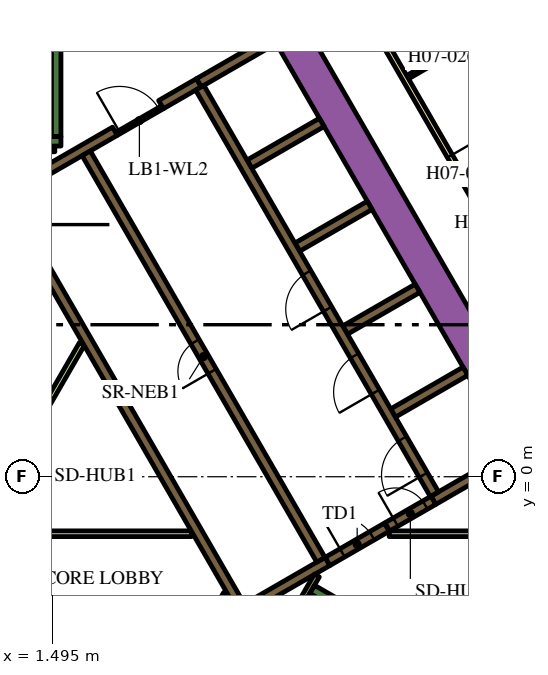
"""IFC4 building model, lengths in metres.
Left out: names, types, materials, properties, quantities, classifications, styles, units other than length and angle.
Written with IfcOpenShell. Run it as: python <this file> out.ifc"""

import sys

from ifc_helpers import new_model, si_unit, direction, frame, frame_2d, origin, place, context, subcontext, project, spatial, polyline, rectangle, outline, extrude, element, fill, save


model = new_model("IFC4")
c1 = context("Model", 3, precision=1e-05, world=origin(), true_north=direction((0.0, 1.0)))
c2 = subcontext(c1, "Body", "Model", "MODEL_VIEW")
j1 = project(units=[si_unit("LENGTHUNIT", "METRE"), si_unit("PLANEANGLEUNIT", "RADIAN")], contexts=[c1])
p1 = place(None, origin())
s1 = spatial("IfcSite", under=j1, at=p1, CompositionType="ELEMENT")
p2 = place(p1, origin())
s2 = spatial("IfcBuilding", under=s1, at=p2, CompositionType="ELEMENT")
p3 = place(p2, frame((0.0, 0.0, 99.3)))
s3 = spatial("IfcBuildingStorey", under=s2, at=p3, CompositionType="ELEMENT", Elevation=99.3)
p4 = place(p3, frame((6.776, 13.364, 0.0), z_axis=(0.0, 0.0, 1.0), x_axis=(0.500004177138, -0.8660229921, 0.0)))
e1 = element("IfcWall", 1, at=p4, inside=s3, PredefinedType="SOLIDWALL", context=c2, shape_type="SweptSolid", body=[
    extrude(rectangle(XDim=20.204, YDim=0.9, at=frame_2d((10.102, 0.0))), origin(), (0.0, 0.0, 1.0), 3.9),
])
p5 = place(p3, frame((8.334, -2.964, 0.0), z_axis=(0.0, 0.0, 1.0), x_axis=(0.866016039709, -0.500016218704, 0.0)))
e2 = element("IfcWall", 2, at=p5, inside=s3, PredefinedType="SOLIDWALL", context=c2, shape_type="SweptSolid", body=[
    extrude(rectangle(XDim=7.05, YDim=0.25, at=frame_2d((3.525, 0.0))), origin(), (0.0, 0.0, 1.0), 3.9),
])
p6 = place(p3, frame((8.168, -3.503, 0.0), z_axis=(0.0, 0.0, 1.0), x_axis=(0.49972245349, 0.866185586049, 0.0)))
e3 = element("IfcWall", 3, at=p6, inside=s3, PredefinedType="SOLIDWALL", context=c2, shape_type="SweptSolid", body=[
    extrude(rectangle(XDim=0.425, YDim=0.25, at=frame_2d((0.212, 0.0))), origin(), (0.0, 0.0, 1.0), 3.9),
])
p7 = place(p3, frame((1.6, 8.95, 0.0), z_axis=(0.0, 0.0, 1.0), x_axis=(0.0, 1.0, 0.0)))
e4 = element("IfcWall", 4, at=p7, inside=s3, PredefinedType="SOLIDWALL", context=c2, shape_type="SweptSolid", body=[
    extrude(rectangle(XDim=6.8, YDim=0.25, at=frame_2d((3.4, 0.0))), origin(), (0.0, 0.0, 1.0), 3.9),
])
p8 = place(p3, frame((1.05, 8.825, 0.0), z_axis=(0.0, 0.0, 1.0), x_axis=(1.0, 0.0, 0.0)))
e5 = element("IfcWall", 5, at=p8, inside=s3, PredefinedType="SOLIDWALL", context=c2, shape_type="SweptSolid", body=[
    extrude(rectangle(XDim=0.675, YDim=0.25, at=frame_2d((0.337, 0.0))), origin(), (0.0, 0.0, 1.0), 3.9),
])
p9 = place(p3, frame((10.464, 1.677, 0.0), z_axis=(0.0, 0.0, 1.0), x_axis=(0.86605622881, 0.499946605688, 0.0)))
e6 = element("IfcWall", 6, at=p9, inside=s3, PredefinedType="SOLIDWALL", context=c2, shape_type="SweptSolid", body=[
    extrude(rectangle(XDim=2.2, YDim=0.25, at=frame_2d((1.1, 0.0))), origin(), (0.0, 0.0, 1.0), 3.9),
])
p10 = place(p3, frame((13.629, 0.594, 0.0), z_axis=(0.0, 0.0, 1.0), x_axis=(-0.866063384774, -0.499934209226, 0.0)))
e7 = element("IfcWall", 7, at=p10, inside=s3, PredefinedType="SOLIDWALL", context=c2, shape_type="SweptSolid", body=[
    extrude(rectangle(XDim=2.428, YDim=0.25, at=frame_2d((1.214, 0.0))), origin(), (0.0, 0.0, 1.0), 3.9),
])
p11 = place(p3, origin())
e8 = element("IfcWall", 8, at=p11, inside=s3, PredefinedType="SOLIDWALL", context=c2, shape_type="SweptSolid", body=[
    extrude(outline(polyline([(0.566, 6.725), (0.566, 6.875), (0.566, 6.875), (0.565, 6.875), (0.361, 6.875), (0.035, 7.439), (0.252, 7.564), (0.377, 7.348), (6.552, -3.348), (6.677, -3.564), (6.46, -3.689), (0.448, 6.725), (0.565, 6.725), (0.566, 6.725), (0.566, 6.725)])), origin(), (0.0, 0.0, 1.0), 3.9),
])
p12 = place(p3, frame((4.358, 9.791, 0.0), z_axis=(0.0, 0.0, 1.0), x_axis=(0.866079547155, 0.499906209203, 0.0)))
e9 = element("IfcWall", 9, at=p12, inside=s3, PredefinedType="SOLIDWALL", context=c2, shape_type="SweptSolid", body=[
    extrude(rectangle(XDim=1.15, YDim=0.25, at=frame_2d((0.575, 0.0))), origin(), (0.0, 0.0, 1.0), 3.9),
])
p13 = place(p3, frame((5.356, 10.367, 0.0), z_axis=(0.0, 0.0, 1.0), x_axis=(0.865978535641, 0.50008116922, 0.0)))
e10 = element("IfcWall", 10, at=p13, inside=s3, PredefinedType="SOLIDWALL", context=c2, shape_type="SweptSolid", body=[
    extrude(rectangle(XDim=2.278, YDim=0.25, at=frame_2d((1.139, 0.0))), origin(), (0.0, 0.0, 1.0), 3.9),
])
p14 = place(p3, frame((0.314, 7.456, 0.0), z_axis=(0.0, 0.0, 1.0), x_axis=(0.866013897511, 0.50001992892, 0.0)))
e11 = element("IfcWall", 11, at=p14, inside=s3, PredefinedType="SOLIDWALL", context=c2, shape_type="SweptSolid", body=[
    extrude(rectangle(XDim=3.268, YDim=0.25, at=frame_2d((1.634, 0.0))), origin(), (0.0, 0.0, 1.0), 3.9),
])
p15 = place(p3, frame((6.614, -3.456, 0.0), z_axis=(0.0, 0.0, 1.0), x_axis=(0.866031582473, 0.499989298045, 0.0)))
e12 = element("IfcWall", 12, at=p15, inside=s3, PredefinedType="SOLIDWALL", context=c2, shape_type="SweptSolid", body=[
    extrude(rectangle(XDim=2.455, YDim=0.25, at=frame_2d((1.228, 0.0))), origin(), (0.0, 0.0, 1.0), 3.9),
])
for number, where, z_axis, x_axis in (
    (13, (6.684, 8.224, 0.0), (0.0, 0.0, 1.0), (0.866, 0.5, 0.0)),
    (14, (7.944, 6.041, 0.0), (0.0, 0.0, 1.0), (0.866, 0.5, 0.0)),
    (15, (9.204, 3.859, 0.0), (0.0, 0.0, 1.0), (0.866, 0.5, 0.0)),
):
    element("IfcWall", number, at=place(p3, frame(where, z_axis=z_axis, x_axis=x_axis)), inside=s3, PredefinedType="SOLIDWALL", context=c2, shape_type="SweptSolid", body=[
        extrude(rectangle(XDim=2.2, YDim=0.25, at=frame_2d((1.1, 0.0))), origin(), (0.0, 0.0, 1.0), 3.9),
    ])
p16 = place(p3, frame((5.705, -3.718, 0.0), z_axis=(0.0, 0.0, 1.0), x_axis=(0.499962090823, 0.866047289552, 0.0)))
e16 = element("IfcWall", 16, at=p16, inside=s3, PredefinedType="PARTITIONING", context=c2, shape_type="SweptSolid", body=[
    extrude(rectangle(XDim=0.735, YDim=0.15, at=frame_2d((0.367, 0.0))), origin(), (0.0, 0.0, 1.0), 2.75),
])
p17 = place(p3, frame((8.459, -2.599, 0.0), z_axis=(0.0, 0.0, 1.0), x_axis=(-0.500041054325, -0.866001699761, 0.0)))
e17 = element("IfcWall", 17, at=p17, inside=s3, PredefinedType="PARTITIONING", context=c2, shape_type="SweptSolid", body=[
    extrude(rectangle(XDim=0.929, YDim=0.15, at=frame_2d((0.464, 0.0))), origin(), (0.0, 0.0, 1.0), 3.9),
])
p18 = place(p3, frame((10.362, -1.5, 0.0), z_axis=(0.0, 0.0, 1.0), x_axis=(1.0, 0.0, 0.0)))
e18 = element("IfcWall", 18, at=p18, inside=s3, PredefinedType="PARTITIONING", context=c2, shape_type="SweptSolid", body=[
    extrude(rectangle(XDim=4.439, YDim=0.15, at=frame_2d((2.22, 0.0))), origin(), (0.0, 0.0, 1.0), 2.75),
])
p19 = place(p3, frame((-4.2, -1.5, 0.0), z_axis=(0.0, 0.0, 1.0), x_axis=(1.0, 0.0, 0.0)))
e19 = element("IfcWall", 19, at=p19, inside=s3, PredefinedType="PARTITIONING", context=c2, shape_type="SweptSolid", body=[
    extrude(rectangle(XDim=9.359, YDim=0.15, at=frame_2d((4.68, 0.0))), origin(), (0.0, 0.0, 1.0), 2.75),
])
p20 = place(p3, frame((1.312, 1.822, 0.0), z_axis=(0.0, 0.0, 1.0), x_axis=(0.500003549559, 0.866023354436, 0.0)))
e20 = element("IfcWall", 20, at=p20, inside=s3, PredefinedType="PARTITIONING", context=c2, shape_type="SweptSolid", body=[
    extrude(rectangle(XDim=1.93, YDim=0.15, at=frame_2d((0.965, 0.0))), origin(), (0.0, 0.0, 1.0), 2.75),
])
p21 = place(p3, frame((1.05, 8.625, 0.0), z_axis=(0.0, 0.0, 1.0), x_axis=(1.0, 0.0, 0.0)))
e21 = element("IfcWall", 21, at=p21, inside=s3, PredefinedType="PARTITIONING", context=c2, shape_type="SweptSolid", body=[
    extrude(rectangle(XDim=0.514, YDim=0.15, at=frame_2d((0.257, 0.0))), origin(), (0.0, 0.0, 1.0), 2.75),
])
p22 = place(p3, frame((11.553, -0.46, 0.0), z_axis=(0.0, 0.0, 1.0), x_axis=(-0.500006514828, 0.866021642414, 0.0)))
e22 = element("IfcWall", 22, at=p22, inside=s3, PredefinedType="SOLIDWALL", context=c2, shape_type="SweptSolid", body=[
    extrude(rectangle(XDim=12.35, YDim=0.25, at=frame_2d((6.175, 0.0))), origin(), (0.0, 0.0, 1.0), 3.9),
])
p23 = place(p22, frame((0.585, 0.0, 0.0)))
e23 = element("IfcOpeningElement", 23, at=p23, cuts=e22, PredefinedType="OPENING", context=c2, shape_type="SweptSolid", body=[
    extrude(rectangle(XDim=1.1, YDim=2.1, at=frame_2d((0.55, 1.05))), frame((0.0, 0.135, 0.0), z_axis=(0.0, -1.0, 0.0), x_axis=(1.0, 0.0, 0.0)), (0.0, 0.0, 1.0), 0.27),
])
p24 = place(p22, frame((3.105, 0.0, 0.0)))
e24 = element("IfcOpeningElement", 24, at=p24, cuts=e22, PredefinedType="OPENING", context=c2, shape_type="SweptSolid", body=[
    extrude(rectangle(XDim=1.1, YDim=2.1, at=frame_2d((0.55, 1.05))), frame((0.0, 0.135, 0.0), z_axis=(0.0, -1.0, 0.0), x_axis=(1.0, 0.0, 0.0)), (0.0, 0.0, 1.0), 0.27),
])
p25 = place(p22, frame((5.625, 0.0, 0.0)))
e25 = element("IfcOpeningElement", 25, at=p25, cuts=e22, PredefinedType="OPENING", context=c2, shape_type="SweptSolid", body=[
    extrude(rectangle(XDim=1.1, YDim=2.1, at=frame_2d((0.55, 1.05))), frame((0.0, 0.135, 0.0), z_axis=(0.0, -1.0, 0.0), x_axis=(1.0, 0.0, 0.0)), (0.0, 0.0, 1.0), 0.27),
])
p26 = place(p3, frame((8.565, -2.185, 0.0), z_axis=(0.0, 0.0, 1.0), x_axis=(-0.499997954832, 0.866026584559, 0.0)))
e26 = element("IfcWall", 26, at=p26, inside=s3, PredefinedType="SOLIDWALL", context=c2, shape_type="SweptSolid", body=[
    extrude(rectangle(XDim=12.35, YDim=0.25, at=frame_2d((6.175, 0.0))), origin(), (0.0, 0.0, 1.0), 3.9),
])
p27 = place(p26, frame((5.725, 0.0, 0.0)))
e27 = element("IfcOpeningElement", 27, at=p27, cuts=e26, PredefinedType="OPENING", context=c2, shape_type="SweptSolid", body=[
    extrude(rectangle(XDim=0.9, YDim=2.1, at=frame_2d((0.45, 1.05))), frame((0.0, 0.135, 0.0), z_axis=(0.0, -1.0, 0.0), x_axis=(1.0, 0.0, 0.0)), (0.0, 0.0, 1.0), 0.27),
])
p28 = place(p3, frame((8.74, -2.229, 0.0), z_axis=(0.0, 0.0, 1.0), x_axis=(0.865989075817, 0.500062916607, 0.0)))
e28 = element("IfcWall", 28, at=p28, inside=s3, PredefinedType="SOLIDWALL", context=c2, shape_type="SweptSolid", body=[
    extrude(rectangle(XDim=1.8, YDim=0.25, at=frame_2d((0.9, 0.0))), origin(), (0.0, 0.0, 1.0), 3.9),
])
p29 = place(p28, frame((0.45, 0.0, 0.0)))
e29 = element("IfcOpeningElement", 29, at=p29, cuts=e28, PredefinedType="OPENING", context=c2, shape_type="SweptSolid", body=[
    extrude(rectangle(XDim=0.9, YDim=2.1, at=frame_2d((0.45, 1.05))), frame((0.0, 0.135, 0.0), z_axis=(0.0, -1.0, 0.0), x_axis=(1.0, 0.0, 0.0)), (0.0, 0.0, 1.0), 0.27),
])
p30 = place(p3, frame((3.183, 9.02, 0.0), z_axis=(0.0, 0.0, 1.0), x_axis=(0.866034573852, 0.49998411664, 0.0)))
e30 = element("IfcWall", 30, at=p30, inside=s3, PredefinedType="PARTITIONING", context=c2, shape_type="SweptSolid", body=[
    extrude(rectangle(XDim=1.4, YDim=0.09, at=frame_2d((0.7, 0.0))), origin(), (0.0, 0.0, 1.0), 2.75),
])
p31 = place(p30, frame((0.1, 0.0, 0.0)))
e31 = element("IfcOpeningElement", 31, at=p31, cuts=e30, PredefinedType="OPENING", context=c2, shape_type="SweptSolid", body=[
    extrude(rectangle(XDim=1.2, YDim=2.1, at=frame_2d((0.6, 1.05))), frame((0.0, 0.055, 0.0), z_axis=(0.0, -1.0, 0.0), x_axis=(1.0, 0.0, 0.0)), (0.0, 0.0, 1.0), 0.11),
])
p32 = place(p3, frame((10.313, -1.32, 0.0), z_axis=(0.0, 0.0, 1.0), x_axis=(0.866034573852, 0.49998411664, 0.0)))
e32 = element("IfcWall", 32, at=p32, inside=s3, PredefinedType="SOLIDWALL", context=c2, shape_type="SweptSolid", body=[
    extrude(rectangle(XDim=1.4, YDim=0.25, at=frame_2d((0.7, 0.0))), origin(), (0.0, 0.0, 1.0), 3.9),
])
p33 = place(p32, frame((0.25, 0.0, 0.0)))
e33 = element("IfcOpeningElement", 33, at=p33, cuts=e32, PredefinedType="OPENING", context=c2, shape_type="SweptSolid", body=[
    extrude(rectangle(XDim=0.9, YDim=2.1, at=frame_2d((0.45, 1.05))), frame((0.0, 0.135, 0.0), z_axis=(0.0, -1.0, 0.0), x_axis=(1.0, 0.0, 0.0)), (0.0, 0.0, 1.0), 0.27),
])
p34 = place(p3, frame((6.163, 18.475, 0.0), z_axis=(0.0, 0.0, 1.0), x_axis=(0.500001317485, -0.866024643133, 0.0)))
e34 = element("IfcWall", 34, at=p34, inside=s3, PredefinedType="PARTITIONING", context=c2, shape_type="SweptSolid", body=[
    extrude(rectangle(XDim=25.767, YDim=0.15, at=frame_2d((12.883, 0.0))), origin(), (0.0, 0.0, 1.0), 2.75),
])
p35 = place(p34, frame((24.241, 0.0, 0.0)))
e35 = element("IfcOpeningElement", 35, at=p35, cuts=e34, PredefinedType="OPENING", context=c2, shape_type="SweptSolid", body=[
    extrude(rectangle(XDim=1.0, YDim=2.1, at=frame_2d((0.5, 1.05))), frame((0.0, 0.085, 0.0), z_axis=(0.0, -1.0, 0.0), x_axis=(1.0, 0.0, 0.0)), (0.0, 0.0, 1.0), 0.17),
])
p36 = place(p34, frame((13.144, 0.0, 0.0)))
e36 = element("IfcOpeningElement", 36, at=p36, cuts=e34, PredefinedType="OPENING", context=c2, shape_type="SweptSolid", body=[
    extrude(rectangle(XDim=1.0, YDim=2.1, at=frame_2d((0.5, 1.05))), frame((0.0, 0.085, 0.0), z_axis=(0.0, -1.0, 0.0), x_axis=(1.0, 0.0, 0.0)), (0.0, 0.0, 1.0), 0.17),
])
p37 = place(p34, frame((11.592, 0.0, 0.0)))
e37 = element("IfcOpeningElement", 37, at=p37, cuts=e34, PredefinedType="OPENING", context=c2, shape_type="SweptSolid", body=[
    extrude(rectangle(XDim=1.1, YDim=2.1, at=frame_2d((0.55, 1.05))), frame((0.0, 0.085, 0.0), z_axis=(0.0, -1.0, 0.0), x_axis=(1.0, 0.0, 0.0)), (0.0, 0.0, 1.0), 0.17),
])
p38 = place(p34, frame((4.674, 0.0, 0.0)))
e38 = element("IfcOpeningElement", 38, at=p38, cuts=e34, PredefinedType="OPENING", context=c2, shape_type="SweptSolid", body=[
    extrude(rectangle(XDim=0.9, YDim=2.1, at=frame_2d((0.45, 1.05))), frame((0.0, 0.085, 0.0), z_axis=(0.0, -1.0, 0.0), x_axis=(1.0, 0.0, 0.0)), (0.0, 0.0, 1.0), 0.17),
])
p39 = place(p34, frame((2.411, 0.0, 0.0)))
e39 = element("IfcOpeningElement", 39, at=p39, cuts=e34, PredefinedType="OPENING", context=c2, shape_type="SweptSolid", body=[
    extrude(rectangle(XDim=1.0, YDim=2.1, at=frame_2d((0.5, 1.05))), frame((0.0, 0.085, 0.0), z_axis=(0.0, -1.0, 0.0), x_axis=(1.0, 0.0, 0.0)), (0.0, 0.0, 1.0), 0.17),
])
p40 = place(p3, frame((10.847, 10.513, 0.0), z_axis=(0.0, 0.0, 1.0), x_axis=(0.865996816683, 0.500049511043, 0.0)))
e40 = element("IfcWall", 40, at=p40, inside=s3, PredefinedType="PARTITIONING", context=c2, shape_type="SweptSolid", body=[
    extrude(rectangle(XDim=2.8, YDim=0.1, at=frame_2d((1.4, 0.0))), origin(), (0.0, 0.0, 1.0), 2.75),
])
p41 = place(p40, frame((0.55, 0.0, 0.0)))
e41 = element("IfcOpeningElement", 41, at=p41, cuts=e40, PredefinedType="OPENING", context=c2, shape_type="SweptSolid", body=[
    extrude(rectangle(XDim=1.0, YDim=2.1, at=frame_2d((0.5, 1.05))), frame((0.0, 0.06, 0.0), z_axis=(0.0, -1.0, 0.0), x_axis=(1.0, 0.0, 0.0)), (0.0, 0.0, 1.0), 0.12),
])
p42 = place(p23, origin())
e42 = element("IfcDoor", 42, at=p42, inside=s3, OperationType="DOUBLE_DOOR_SLIDING", PredefinedType="DOOR", context=c2, shape_type="SweptSolid", body=[
    extrude(rectangle(XDim=1.1, YDim=2.1, at=frame_2d((0.55, 1.05))), frame((0.0, 0.025, 0.0), z_axis=(0.0, -1.0, 0.0), x_axis=(1.0, 0.0, 0.0)), (0.0, 0.0, 1.0), 0.05),
])
fill(e23, e42)
p43 = place(p24, origin())
e43 = element("IfcDoor", 43, at=p43, inside=s3, OperationType="DOUBLE_DOOR_SLIDING", PredefinedType="DOOR", context=c2, shape_type="SweptSolid", body=[
    extrude(rectangle(XDim=1.1, YDim=2.1, at=frame_2d((0.55, 1.05))), frame((0.0, 0.025, 0.0), z_axis=(0.0, -1.0, 0.0), x_axis=(1.0, 0.0, 0.0)), (0.0, 0.0, 1.0), 0.05),
])
fill(e24, e43)
p44 = place(p25, origin())
e44 = element("IfcDoor", 44, at=p44, inside=s3, OperationType="DOUBLE_DOOR_SLIDING", PredefinedType="DOOR", context=c2, shape_type="SweptSolid", body=[
    extrude(rectangle(XDim=1.1, YDim=2.1, at=frame_2d((0.55, 1.05))), frame((0.0, 0.025, 0.0), z_axis=(0.0, -1.0, 0.0), x_axis=(1.0, 0.0, 0.0)), (0.0, 0.0, 1.0), 0.05),
])
fill(e25, e44)
p45 = place(p27, origin())
e45 = element("IfcDoor", 45, at=p45, inside=s3, OperationType="SINGLE_SWING_LEFT", PredefinedType="DOOR", context=c2, shape_type="SweptSolid", body=[
    extrude(rectangle(XDim=0.9, YDim=2.1, at=frame_2d((0.45, 1.05))), frame((0.0, 0.025, 0.0), z_axis=(0.0, -1.0, 0.0), x_axis=(1.0, 0.0, 0.0)), (0.0, 0.0, 1.0), 0.05),
])
fill(e27, e45)
p46 = place(p29, origin())
e46 = element("IfcDoor", 46, at=p46, inside=s3, OperationType="SINGLE_SWING_LEFT", PredefinedType="DOOR", context=c2, shape_type="SweptSolid", body=[
    extrude(rectangle(XDim=0.9, YDim=2.1, at=frame_2d((0.45, 1.05))), frame((0.0, 0.025, 0.0), z_axis=(0.0, -1.0, 0.0), x_axis=(1.0, 0.0, 0.0)), (0.0, 0.0, 1.0), 0.05),
])
fill(e29, e46)
p47 = place(p31, origin())
e47 = element("IfcDoor", 47, at=p47, inside=s3, OperationType="SINGLE_SWING_LEFT", PredefinedType="DOOR", context=c2, shape_type="SweptSolid", body=[
    extrude(rectangle(XDim=1.2, YDim=2.1, at=frame_2d((0.6, 1.05))), frame((0.0, 0.025, 0.0), z_axis=(0.0, -1.0, 0.0), x_axis=(1.0, 0.0, 0.0)), (0.0, 0.0, 1.0), 0.05),
])
fill(e31, e47)
p48 = place(p33, origin())
e48 = element("IfcDoor", 48, at=p48, inside=s3, OperationType="SINGLE_SWING_LEFT", PredefinedType="DOOR", context=c2, shape_type="SweptSolid", body=[
    extrude(rectangle(XDim=0.9, YDim=2.1, at=frame_2d((0.45, 1.05))), frame((0.0, 0.025, 0.0), z_axis=(0.0, -1.0, 0.0), x_axis=(1.0, 0.0, 0.0)), (0.0, 0.0, 1.0), 0.05),
])
fill(e33, e48)
p49 = place(p37, origin())
e49 = element("IfcDoor", 49, at=p49, inside=s3, OperationType="SINGLE_SWING_RIGHT", PredefinedType="DOOR", context=c2, shape_type="SweptSolid", body=[
    extrude(rectangle(XDim=1.1, YDim=2.1, at=frame_2d((0.55, 1.05))), frame((0.0, 0.025, 0.0), z_axis=(0.0, -1.0, 0.0), x_axis=(1.0, 0.0, 0.0)), (0.0, 0.0, 1.0), 0.05),
])
fill(e37, e49)
p50 = place(p41, origin())
e50 = element("IfcDoor", 50, at=p50, inside=s3, OperationType="SINGLE_SWING_LEFT", PredefinedType="DOOR", context=c2, shape_type="SweptSolid", body=[
    extrude(rectangle(XDim=1.0, YDim=2.1, at=frame_2d((0.5, 1.05))), frame((0.0, 0.025, 0.0), z_axis=(0.0, -1.0, 0.0), x_axis=(1.0, 0.0, 0.0)), (0.0, 0.0, 1.0), 0.05),
])
fill(e41, e50)
save(model, sys.argv[1])
